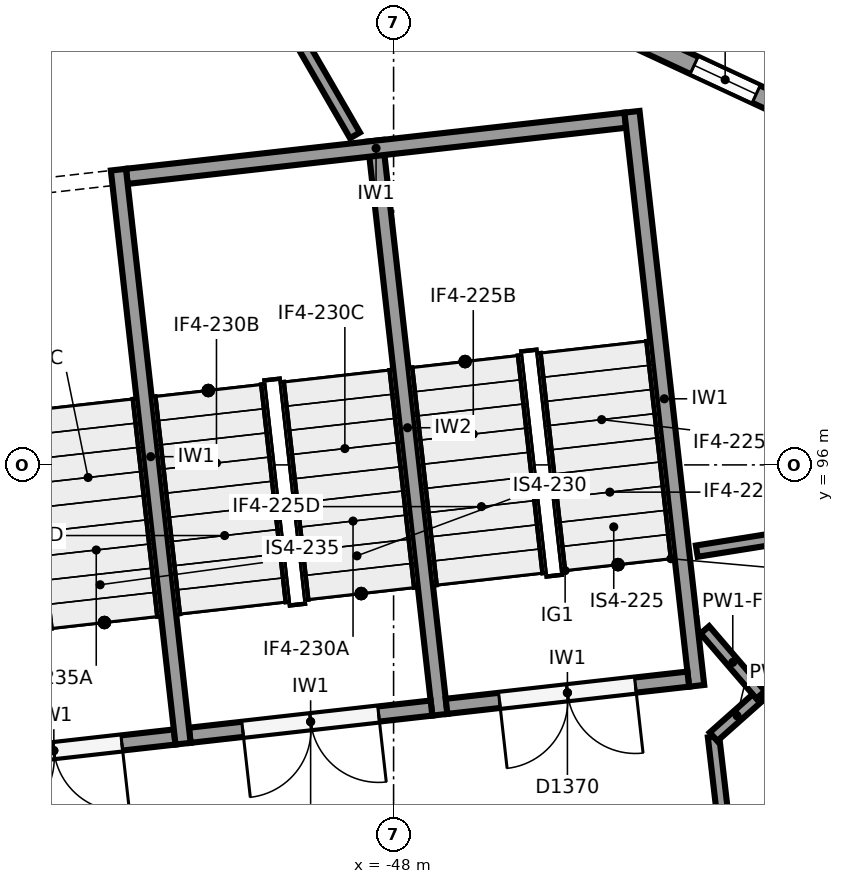
"""IFC4 building model, lengths in metres.
Left out: names, types, materials, properties, quantities, classifications, styles, units other than length and angle.
Written with IfcOpenShell. Run it as: python <this file> out.ifc"""

import sys

from ifc_helpers import new_model, si_unit, direction, frame, frame_2d, origin, origin_2d, place, context, subcontext, project, spatial, rectangle, circle, extrude, element, fill, save


model = new_model("IFC4")
c1 = context("Model", 3, precision=1e-05, world=origin(), true_north=direction((0.0, 1.0)))
c2 = subcontext(c1, "Body", "Model", "MODEL_VIEW")
j1 = project(units=[si_unit("LENGTHUNIT", "METRE"), si_unit("PLANEANGLEUNIT", "RADIAN")], contexts=[c1])
p1 = place(None, origin())
s1 = spatial("IfcSite", under=j1, at=p1, CompositionType="ELEMENT")
p2 = place(p1, origin())
s2 = spatial("IfcBuilding", under=s1, at=p2, CompositionType="ELEMENT")
p3 = place(p2, frame((0.0, 0.0, 18.0)))
s3 = spatial("IfcBuildingStorey", under=s2, at=p3, CompositionType="ELEMENT", Elevation=18.0)
p4 = place(p3, frame((-44.683, 91.091, 0.0), z_axis=(0.0, 0.0, 1.0), x_axis=(1.0, 0.0, 0.0)))
e1 = element("IfcColumn", 1, at=p4, inside=s3, PredefinedType="COLUMN", context=c2, shape_type="SweptSolid", body=[
    extrude(circle(Radius=0.55, at=origin_2d()), origin(), (0.0, 0.0, 1.0), 6.0),
])
p5 = place(p3, frame((-51.569, 104.757, 0.0), z_axis=(0.0, 0.0, 1.0), x_axis=(0.906698705786, -0.421778919491, 0.0)))
e2 = element("IfcWall", 2, at=p5, inside=s3, PredefinedType="SOLIDWALL", context=c2, shape_type="SweptSolid", body=[
    extrude(rectangle(XDim=14.148, YDim=0.25, at=frame_2d((7.074, 0.0))), origin(), (0.0, 0.0, 1.0), 4.3),
])
p6 = place(p5, frame((12.498, 0.0, 1.0)))
e3 = element("IfcOpeningElement", 3, at=p6, cuts=e2, PredefinedType="OPENING", context=c2, shape_type="SweptSolid", body=[
    extrude(rectangle(XDim=0.9, YDim=3.25, at=frame_2d((0.45, 1.625))), frame((0.0, 0.135, 0.0), z_axis=(0.0, -1.0, 0.0), x_axis=(1.0, 0.0, 0.0)), (0.0, 0.0, 1.0), 0.27),
])
p7 = place(p5, frame((10.397, 0.0, 1.0)))
e4 = element("IfcOpeningElement", 4, at=p7, cuts=e2, PredefinedType="OPENING", context=c2, shape_type="SweptSolid", body=[
    extrude(rectangle(XDim=0.9, YDim=3.25, at=frame_2d((0.45, 1.625))), frame((0.0, 0.135, 0.0), z_axis=(0.0, -1.0, 0.0), x_axis=(1.0, 0.0, 0.0)), (0.0, 0.0, 1.0), 0.27),
])
p8 = place(p5, frame((8.297, 0.0, 1.0)))
e5 = element("IfcOpeningElement", 5, at=p8, cuts=e2, PredefinedType="OPENING", context=c2, shape_type="SweptSolid", body=[
    extrude(rectangle(XDim=0.9, YDim=3.25, at=frame_2d((0.45, 1.625))), frame((0.0, 0.135, 0.0), z_axis=(0.0, -1.0, 0.0), x_axis=(1.0, 0.0, 0.0)), (0.0, 0.0, 1.0), 0.27),
])
p9 = place(p3, frame((-44.863, 100.646, 0.0), z_axis=(0.0, 0.0, 1.0), x_axis=(0.111951003472, -0.993713727802, 0.0)))
e6 = element("IfcWall", 6, at=p9, inside=s3, PredefinedType="SHEAR", context=c2, shape_type="SweptSolid", body=[
    extrude(rectangle(XDim=7.6, YDim=0.2, at=frame_2d((3.8, 0.0))), origin(), (0.0, 0.0, 1.0), 5.6),
])
p10 = place(p3, frame((-51.621, 99.885, 0.0), z_axis=(0.0, 0.0, 1.0), x_axis=(0.111947429915, -0.993714130389, 0.0)))
e7 = element("IfcWall", 7, at=p10, inside=s3, PredefinedType="SHEAR", context=c2, shape_type="SweptSolid", body=[
    extrude(rectangle(XDim=7.6, YDim=0.2, at=frame_2d((3.8, 0.0))), origin(), (0.0, 0.0, 1.0), 5.6),
])
for number, where, z_axis, x_axis in (
    (8, (-44.951, 100.535, 0.0), (0.0, 0.0, 1.0), (-0.994, -0.112, 0.0)),
    (9, (-51.709, 99.774, 0.0), (0.0, 0.0, 1.0), (-0.994, -0.112, 0.0)),
):
    element("IfcWall", number, at=place(p3, frame(where, z_axis=z_axis, x_axis=x_axis)), inside=s3, PredefinedType="SHEAR", context=c2, shape_type="SweptSolid", body=[
        extrude(rectangle(XDim=6.6, YDim=0.2, at=frame_2d((3.3, 0.0))), origin(), (0.0, 0.0, 1.0), 5.6),
    ])
p11 = place(p3, frame((-48.242, 100.265, 0.0), z_axis=(0.0, 0.0, 1.0), x_axis=(0.111954577255, -0.993713325176, 0.0)))
e10 = element("IfcWall", 10, at=p11, inside=s3, PredefinedType="SHEAR", context=c2, shape_type="SweptSolid", body=[
    extrude(rectangle(XDim=7.6, YDim=0.2, at=frame_2d((3.8, 0.0))), origin(), (0.0, 0.0, 1.0), 5.6),
])
p12 = place(p3, frame((-44.123, 93.182, 0.0), z_axis=(0.0, 0.0, 1.0), x_axis=(-0.993717005286, -0.11192190762, 0.0)))
e11 = element("IfcWall", 11, at=p12, inside=s3, PredefinedType="SHEAR", context=c2, shape_type="SweptSolid", body=[
    extrude(rectangle(XDim=3.2, YDim=0.2, at=frame_2d((1.6, 0.0))), origin(), (0.0, 0.0, 1.0), 5.6),
])
p13 = place(p12, frame((0.7, 0.0, 0.0)))
e12 = element("IfcOpeningElement", 12, at=p13, cuts=e11, PredefinedType="OPENING", context=c2, shape_type="SweptSolid", body=[
    extrude(rectangle(XDim=1.8, YDim=2.1, at=frame_2d((0.9, 1.05))), frame((0.0, 0.11, 0.0), z_axis=(0.0, -1.0, 0.0), x_axis=(1.0, 0.0, 0.0)), (0.0, 0.0, 1.0), 0.22),
])
p14 = place(p3, frame((-47.502, 92.801, 0.0), z_axis=(0.0, 0.0, 1.0), x_axis=(-0.993707560215, -0.112005735442, 0.0)))
e13 = element("IfcWall", 13, at=p14, inside=s3, PredefinedType="SHEAR", context=c2, shape_type="SweptSolid", body=[
    extrude(rectangle(XDim=3.2, YDim=0.2, at=frame_2d((1.6, 0.0))), origin(), (0.0, 0.0, 1.0), 5.6),
])
p15 = place(p14, frame((0.7, 0.0, 0.0)))
e14 = element("IfcOpeningElement", 14, at=p15, cuts=e13, PredefinedType="OPENING", context=c2, shape_type="SweptSolid", body=[
    extrude(rectangle(XDim=1.8, YDim=2.1, at=frame_2d((0.9, 1.05))), frame((0.0, 0.11, 0.0), z_axis=(0.0, -1.0, 0.0), x_axis=(1.0, 0.0, 0.0)), (0.0, 0.0, 1.0), 0.22),
])
p16 = place(p3, frame((-50.88, 92.42, 0.0), z_axis=(0.0, 0.0, 1.0), x_axis=(-0.993707560215, -0.112005735442, 0.0)))
e15 = element("IfcWall", 15, at=p16, inside=s3, PredefinedType="SHEAR", context=c2, shape_type="SweptSolid", body=[
    extrude(rectangle(XDim=3.2, YDim=0.2, at=frame_2d((1.6, 0.0))), origin(), (0.0, 0.0, 1.0), 5.6),
])
p17 = place(p16, frame((0.7, 0.0, 0.0)))
e16 = element("IfcOpeningElement", 16, at=p17, cuts=e15, PredefinedType="OPENING", context=c2, shape_type="SweptSolid", body=[
    extrude(rectangle(XDim=1.8, YDim=2.1, at=frame_2d((0.9, 1.05))), frame((0.0, 0.11, 0.0), z_axis=(0.0, -1.0, 0.0), x_axis=(1.0, 0.0, 0.0)), (0.0, 0.0, 1.0), 0.22),
])
p18 = place(p3, frame((-48.508, 100.336, 0.0), z_axis=(0.0, 0.0, 1.0), x_axis=(-0.500439359674, 0.865771590715, 0.0)))
e17 = element("IfcWall", 17, at=p18, inside=s3, PredefinedType="PARTITIONING", context=c2, shape_type="SweptSolid", body=[
    extrude(rectangle(XDim=3.822, YDim=0.15, at=frame_2d((1.911, 0.0))), origin(), (0.0, 0.0, 1.0), 5.6),
])
p19 = place(p3, frame((-37.891, 95.841, 0.0), z_axis=(0.0, 0.0, 1.0), x_axis=(-0.987522859615, -0.157475717929, 0.0)))
e18 = element("IfcWall", 18, at=p19, inside=s3, PredefinedType="PARTITIONING", context=c2, shape_type="SweptSolid", body=[
    extrude(rectangle(XDim=6.197, YDim=0.15, at=frame_2d((3.098, 0.0))), origin(), (0.0, 0.0, 1.0), 5.6),
])
p20 = place(p3, frame((-42.865, 84.478, 0.0), z_axis=(0.0, 0.0, 1.0), x_axis=(-0.115665419158, 0.993288231487, 0.0)))
e19 = element("IfcWall", 19, at=p20, inside=s3, PredefinedType="PARTITIONING", context=c2, shape_type="SweptSolid", body=[
    extrude(rectangle(XDim=8.0, YDim=0.15, at=frame_2d((4.0, 0.0))), origin(), (0.0, 0.0, 1.0), 2.85),
])
p21 = place(p20, frame((4.35, 0.0, 0.0)))
e20 = element("IfcOpeningElement", 20, at=p21, cuts=e19, PredefinedType="OPENING", context=c2, shape_type="SweptSolid", body=[
    extrude(rectangle(XDim=1.8, YDim=2.1, at=frame_2d((0.9, 1.05))), frame((0.0, 0.085, 0.0), z_axis=(0.0, -1.0, 0.0), x_axis=(1.0, 0.0, 0.0)), (0.0, 0.0, 1.0), 0.17),
])
p22 = place(p3, frame((-43.791, 92.424, 0.0), z_axis=(0.0, 0.0, 1.0), x_axis=(0.747490432018, 0.664272575109, 0.0)))
e21 = element("IfcWall", 21, at=p22, inside=s3, PredefinedType="PARTITIONING", context=c2, shape_type="SweptSolid", body=[
    extrude(rectangle(XDim=0.83, YDim=0.15, at=frame_2d((0.415, 0.0))), origin(), (0.0, 0.0, 1.0), 2.914),
])
p23 = place(p3, frame((-43.17, 92.975, 0.0), z_axis=(0.0, 0.0, 1.0), x_axis=(-0.651825129524, 0.75836930352, 0.0)))
e22 = element("IfcWall", 22, at=p23, inside=s3, PredefinedType="PARTITIONING", context=c2, shape_type="SweptSolid", body=[
    extrude(rectangle(XDim=1.127, YDim=0.15, at=frame_2d((0.564, 0.0))), origin(), (0.0, 0.0, 1.0), 2.914),
])
p24 = place(p8, origin())
e23 = element("IfcWindow", 23, at=p24, inside=s3, PartitioningType="SINGLE_PANEL", PredefinedType="WINDOW", context=c2, shape_type="SweptSolid", body=[
    extrude(rectangle(XDim=0.9, YDim=3.25, at=frame_2d((0.45, 1.625))), frame((0.0, 0.03, 0.0), z_axis=(0.0, -1.0, 0.0), x_axis=(1.0, 0.0, 0.0)), (0.0, 0.0, 1.0), 0.06),
])
fill(e5, e23)
p25 = place(p13, origin())
e24 = element("IfcDoor", 24, at=p25, inside=s3, OperationType="DOUBLE_DOOR_SINGLE_SWING", PredefinedType="DOOR", context=c2, shape_type="SweptSolid", body=[
    extrude(rectangle(XDim=1.8, YDim=2.1, at=frame_2d((0.9, 1.05))), frame((0.0, 0.025, 0.0), z_axis=(0.0, -1.0, 0.0), x_axis=(1.0, 0.0, 0.0)), (0.0, 0.0, 1.0), 0.05),
])
fill(e12, e24)
p26 = place(p15, origin())
e25 = element("IfcDoor", 25, at=p26, inside=s3, OperationType="DOUBLE_DOOR_SINGLE_SWING", PredefinedType="DOOR", context=c2, shape_type="SweptSolid", body=[
    extrude(rectangle(XDim=1.8, YDim=2.1, at=frame_2d((0.9, 1.05))), frame((0.0, 0.025, 0.0), z_axis=(0.0, -1.0, 0.0), x_axis=(1.0, 0.0, 0.0)), (0.0, 0.0, 1.0), 0.05),
])
fill(e14, e25)
p27 = place(p17, origin())
e26 = element("IfcDoor", 26, at=p27, inside=s3, OperationType="DOUBLE_DOOR_SINGLE_SWING", PredefinedType="DOOR", context=c2, shape_type="SweptSolid", body=[
    extrude(rectangle(XDim=1.8, YDim=2.1, at=frame_2d((0.9, 1.05))), frame((0.0, 0.025, 0.0), z_axis=(0.0, -1.0, 0.0), x_axis=(1.0, 0.0, 0.0)), (0.0, 0.0, 1.0), 0.05),
])
fill(e16, e26)
save(model, sys.argv[1])
